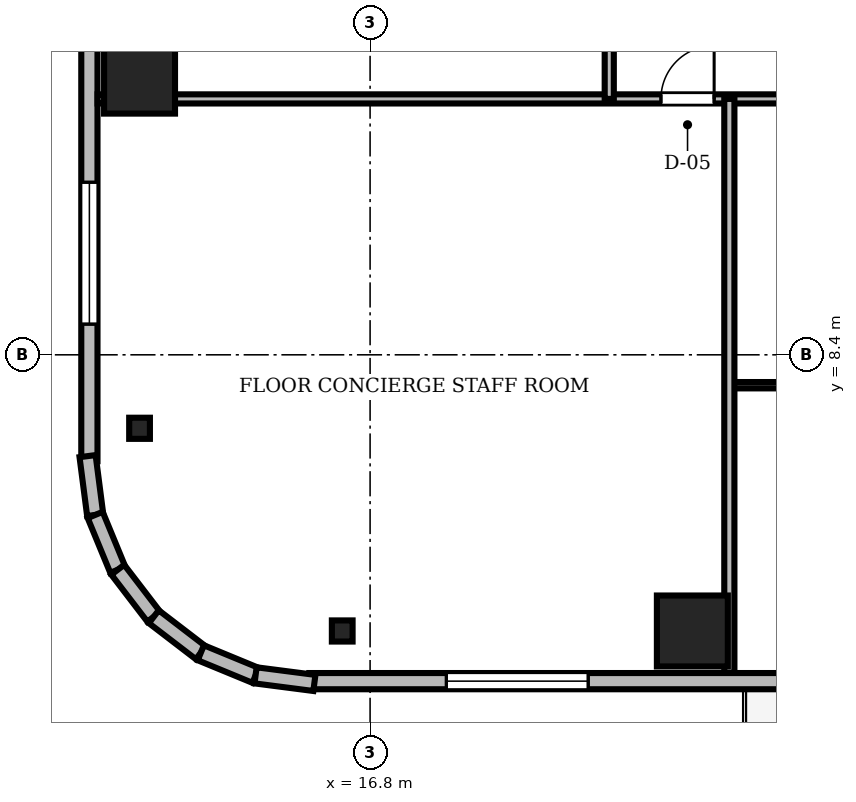
"""IFC4 building model, lengths in metres.
Left out: names, types, materials, properties, quantities, classifications, styles, units other than length and angle.
Written with IfcOpenShell. Run it as: python <this file> out.ifc"""

import sys

from ifc_helpers import new_model, si_unit, direction, frame, frame_2d, origin, origin_2d, place, context, subcontext, project, spatial, rectangle, i_section, extrude, source, transform, mapped, element, fill, save


model = new_model("IFC4")
c1 = context("Model", 3, precision=1e-05, world=origin(), true_north=direction((0.0, 1.0)))
c2 = subcontext(c1, "Body", "Model", "MODEL_VIEW")
j1 = project(units=[si_unit("LENGTHUNIT", "METRE"), si_unit("PLANEANGLEUNIT", "RADIAN")], contexts=[c1])
p1 = place(None, origin())
s1 = spatial("IfcSite", under=j1, at=p1, CompositionType="ELEMENT")
p2 = place(p1, origin())
s2 = spatial("IfcBuilding", under=s1, at=p2, CompositionType="ELEMENT")
p3 = place(p2, frame((0.0, 0.0, 203.55)))
s3 = spatial("IfcBuildingStorey", under=s2, at=p3, CompositionType="ELEMENT", Elevation=203.55)
m1 = source(origin(), c2, "Body", "SweptSolid", [
    extrude(rectangle(XDim=1.4, YDim=1.4, at=origin_2d()), origin(), (0.0, 0.0, 1.0), 3.53),
])
for number, where, z_axis, x_axis in (
    (1, (23.16, 2.95, 0.0), (0.0, 0.0, 1.0), (1.0, 0.0, 0.0)),
    (2, (12.25, 13.86, 0.0), (0.0, 0.0, 1.0), (1.0, 0.0, 0.0)),
):
    element("IfcColumn", number, at=place(p3, frame(where, z_axis=z_axis, x_axis=x_axis)), inside=s3, PredefinedType="COLUMN", context=c2, shape_type="MappedRepresentation", body=[
        mapped(m1, transform((0.0, 0.0, 0.0), scale=1.0)),
    ])
m2 = source(origin(), c2, "Body", "SweptSolid", [
    extrude(i_section(OverallWidth=0.409, OverallDepth=0.417, WebThickness=0.021, FlangeThickness=0.033, FilletRadius=0.015, at=origin_2d()), origin(), (0.0, 0.0, 1.0), 3.53),
])
for number, where, z_axis, x_axis in (
    (3, (16.25, 2.95, 0.0), (0.0, 0.0, 1.0), (1.0, 0.0, 0.0)),
    (4, (12.25, 6.95, 0.0), (0.0, 0.0, 1.0), (1.0, 0.0, 0.0)),
):
    element("IfcColumn", number, at=place(p3, frame(where, z_axis=z_axis, x_axis=x_axis)), inside=s3, PredefinedType="COLUMN", context=c2, shape_type="MappedRepresentation", body=[
        mapped(m2, transform((0.0, 0.0, 0.0), scale=1.0)),
    ])
m3 = source(origin(), c2, "Body", "SweptSolid", [
    extrude(rectangle(XDim=15.6, YDim=0.32, at=frame_2d((7.8, 0.0))), origin(), (0.0, 0.0, 1.0), 3.53),
])
p4 = place(p3, frame((15.6, 1.96, 0.0), z_axis=(0.0, 0.0, 1.0), x_axis=(1.0, 0.0, 0.0)))
e5 = element("IfcWall", 5, at=p4, inside=s3, PredefinedType="SOLIDWALL", context=c2, shape_type="MappedRepresentation", body=[
    mapped(m3, transform((0.0, 0.0, 0.0), scale=1.0)),
])
m4 = source(origin(), c2, "Body", "SweptSolid", [
    extrude(rectangle(XDim=1.4, YDim=2.3, at=frame_2d((0.7, 1.15))), frame((0.0, 0.17, 0.0), z_axis=(0.0, -1.0, 0.0), x_axis=(1.0, 0.0, 0.0)), (0.0, 0.0, 1.0), 0.34),
])
p5 = place(p4, frame((9.61, 0.0, 0.0)))
e6 = element("IfcOpeningElement", 6, at=p5, cuts=e5, PredefinedType="OPENING", context=c2, shape_type="MappedRepresentation", body=[
    mapped(m4, transform((0.0, 0.0, 0.0), scale=1.0)),
])
m5 = source(origin(), c2, "Body", "SweptSolid", [
    extrude(rectangle(XDim=2.8, YDim=2.4, at=frame_2d((1.4, 1.2))), frame((0.0, 0.17, 0.0), z_axis=(0.0, -1.0, 0.0), x_axis=(1.0, 0.0, 0.0)), (0.0, 0.0, 1.0), 0.34),
])
p6 = place(p4, frame((2.705, 0.0, 0.72)))
e7 = element("IfcOpeningElement", 7, at=p6, cuts=e5, PredefinedType="OPENING", context=c2, shape_type="MappedRepresentation", body=[
    mapped(m5, transform((0.0, 0.0, 0.0), scale=1.0)),
])
p7 = place(p3, frame((11.26, 21.9, 0.0), z_axis=(0.0, 0.0, 1.0), x_axis=(0.0, -1.0, 0.0)))
e8 = element("IfcWall", 8, at=p7, inside=s3, PredefinedType="SOLIDWALL", context=c2, shape_type="MappedRepresentation", body=[
    mapped(m3, transform((0.0, 0.0, 0.0), scale=1.0)),
])
p8 = place(p7, frame((10.095, 0.0, 0.72)))
e9 = element("IfcOpeningElement", 9, at=p8, cuts=e8, PredefinedType="OPENING", context=c2, shape_type="MappedRepresentation", body=[
    mapped(m5, transform((0.0, 0.0, 0.0), scale=1.0)),
])
m6 = source(origin(), c2, "Body", "SweptSolid", [
    extrude(rectangle(XDim=1.171, YDim=0.32, at=frame_2d((0.585, 0.0))), origin(), (0.0, 0.0, 1.0), 3.53),
])
p9 = place(p3, frame((11.224, 6.401, 0.0), z_axis=(0.0, 0.0, 1.0), x_axis=(0.128269133229, -0.991739395941, 0.0)))
e10 = element("IfcWall", 10, at=p9, inside=s3, PredefinedType="SOLIDWALL", context=c2, shape_type="MappedRepresentation", body=[
    mapped(m6, transform((0.0, 0.0, 0.0), scale=1.0)),
])
m7 = source(origin(), c2, "Body", "SweptSolid", [
    extrude(rectangle(XDim=1.169, YDim=0.32, at=frame_2d((0.584, 0.0))), origin(), (0.0, 0.0, 1.0), 3.53),
])
for number, where, z_axis, x_axis in (
    (11, (11.375, 5.24, 0.0), (0.0, 0.0, 1.0), (0.381, -0.925, 0.0)),
    (12, (11.82, 4.159, 0.0), (0.0, 0.0, 1.0), (0.608, -0.794, 0.0)),
):
    element("IfcWall", number, at=place(p3, frame(where, z_axis=z_axis, x_axis=x_axis)), inside=s3, PredefinedType="SOLIDWALL", context=c2, shape_type="MappedRepresentation", body=[
        mapped(m7, transform((0.0, 0.0, 0.0), scale=1.0)),
    ])
m8 = source(origin(), c2, "Body", "SweptSolid", [
    extrude(rectangle(XDim=1.169, YDim=0.32, at=frame_2d((0.584, 0.0))), origin(), (0.0, 0.0, 1.0), 3.53),
])
p10 = place(p3, frame((12.531, 3.231, 0.0), z_axis=(0.0, 0.0, 1.0), x_axis=(0.793663520347, -0.608356981114, 0.0)))
e13 = element("IfcWall", 13, at=p10, inside=s3, PredefinedType="SOLIDWALL", context=c2, shape_type="MappedRepresentation", body=[
    mapped(m8, transform((0.0, 0.0, 0.0), scale=1.0)),
])
m9 = source(origin(), c2, "Body", "SweptSolid", [
    extrude(rectangle(XDim=1.169, YDim=0.32, at=frame_2d((0.585, 0.0))), origin(), (0.0, 0.0, 1.0), 3.53),
])
p11 = place(p3, frame((13.459, 2.52, 0.0), z_axis=(0.0, 0.0, 1.0), x_axis=(0.924479075121, -0.381232789334, 0.0)))
e14 = element("IfcWall", 14, at=p11, inside=s3, PredefinedType="SOLIDWALL", context=c2, shape_type="MappedRepresentation", body=[
    mapped(m9, transform((0.0, 0.0, 0.0), scale=1.0)),
])
m10 = source(origin(), c2, "Body", "SweptSolid", [
    extrude(rectangle(XDim=1.17, YDim=0.32, at=frame_2d((0.585, 0.0))), origin(), (0.0, 0.0, 1.0), 3.53),
])
p12 = place(p3, frame((14.54, 2.074, 0.0), z_axis=(0.0, 0.0, 1.0), x_axis=(0.991762485493, -0.128090485085, 0.0)))
e15 = element("IfcWall", 15, at=p12, inside=s3, PredefinedType="SOLIDWALL", context=c2, shape_type="MappedRepresentation", body=[
    mapped(m10, transform((0.0, 0.0, 0.0), scale=1.0)),
])
m11 = source(origin(), c2, "Body", "SweptSolid", [
    extrude(rectangle(XDim=46.156, YDim=0.18, at=frame_2d((23.078, 0.0))), origin(), (0.0, 0.0, 1.0), 2.772),
])
p13 = place(p3, frame((11.422, 13.45, 0.0), z_axis=(0.0, 0.0, 1.0), x_axis=(1.0, 0.0, 0.0)))
e16 = element("IfcWall", 16, at=p13, inside=s3, PredefinedType="PARTITIONING", context=c2, shape_type="MappedRepresentation", body=[
    mapped(m11, transform((0.0, 0.0, 0.0), scale=1.0)),
])
m12 = source(origin(), c2, "Body", "SweptSolid", [
    extrude(rectangle(XDim=1.05, YDim=2.2, at=frame_2d((0.525, 1.1))), frame((0.0, 0.1, 0.0), z_axis=(0.0, -1.0, 0.0), x_axis=(1.0, 0.0, 0.0)), (0.0, 0.0, 1.0), 0.2),
])
p14 = place(p13, frame((11.118, 0.0, 0.0)))
e17 = element("IfcOpeningElement", 17, at=p14, cuts=e16, PredefinedType="OPENING", context=c2, shape_type="MappedRepresentation", body=[
    mapped(m12, transform((0.0, 0.0, 0.0), scale=1.0)),
])
p15 = place(p13, frame((14.939, 0.0, 0.0)))
e18 = element("IfcOpeningElement", 18, at=p15, cuts=e16, PredefinedType="OPENING", context=c2, shape_type="MappedRepresentation", body=[
    mapped(m12, transform((0.0, 0.0, 0.0), scale=1.0)),
])
p16 = place(p13, frame((20.922, 0.0, 0.0)))
e19 = element("IfcOpeningElement", 19, at=p16, cuts=e16, PredefinedType="OPENING", context=c2, shape_type="MappedRepresentation", body=[
    mapped(m12, transform((0.0, 0.0, 0.0), scale=1.0)),
])
p17 = place(p13, frame((26.904, 0.0, 0.0)))
e20 = element("IfcOpeningElement", 20, at=p17, cuts=e16, PredefinedType="OPENING", context=c2, shape_type="MappedRepresentation", body=[
    mapped(m12, transform((0.0, 0.0, 0.0), scale=1.0)),
])
p18 = place(p13, frame((32.887, 0.0, 0.0)))
e21 = element("IfcOpeningElement", 21, at=p18, cuts=e16, PredefinedType="OPENING", context=c2, shape_type="MappedRepresentation", body=[
    mapped(m12, transform((0.0, 0.0, 0.0), scale=1.0)),
])
p19 = place(p13, frame((37.498, 0.0, 0.0)))
e22 = element("IfcOpeningElement", 22, at=p19, cuts=e16, PredefinedType="OPENING", context=c2, shape_type="MappedRepresentation", body=[
    mapped(m12, transform((0.0, 0.0, 0.0), scale=1.0)),
])
m13 = source(origin(), c2, "Body", "SweptSolid", [
    extrude(rectangle(XDim=15.1, YDim=0.18, at=frame_2d((7.55, 0.0))), origin(), (0.0, 0.0, 1.0), 2.972),
])
p20 = place(p3, frame((21.52, 13.45, 0.0), z_axis=(0.0, 0.0, 1.0), x_axis=(0.0, 1.0, 0.0)))
e23 = element("IfcWall", 23, at=p20, inside=s3, PredefinedType="PARTITIONING", context=c2, shape_type="MappedRepresentation", body=[
    mapped(m13, transform((0.0, 0.0, 0.0), scale=1.0)),
])
p21 = place(p20, frame((1.972, 0.0, 0.0)))
e24 = element("IfcOpeningElement", 24, at=p21, cuts=e23, PredefinedType="OPENING", context=c2, shape_type="MappedRepresentation", body=[
    mapped(m12, transform((0.0, 0.0, 0.0), scale=1.0)),
])
m14 = source(origin(), c2, "Body", "SweptSolid", [
    extrude(rectangle(XDim=0.95, YDim=2.15, at=frame_2d((0.475, 1.075))), frame((0.0, 0.1, 0.0), z_axis=(0.0, -1.0, 0.0), x_axis=(1.0, 0.0, 0.0)), (0.0, 0.0, 1.0), 0.2),
])
p22 = place(p20, frame((8.18, 0.0, 0.0)))
e25 = element("IfcOpeningElement", 25, at=p22, cuts=e23, PredefinedType="OPENING", context=c2, shape_type="MappedRepresentation", body=[
    mapped(m14, transform((0.0, 0.0, 0.0), scale=1.0)),
])
p23 = place(p20, frame((13.163, 0.0, 0.0)))
e26 = element("IfcOpeningElement", 26, at=p23, cuts=e23, PredefinedType="OPENING", context=c2, shape_type="MappedRepresentation", body=[
    mapped(m14, transform((0.0, 0.0, 0.0), scale=1.0)),
])
m15 = source(origin(), c2, "Body", "SweptSolid", [
    extrude(rectangle(XDim=5.982, YDim=0.125, at=frame_2d((2.991, 0.0))), origin(), (0.0, 0.0, 1.0), 2.972),
])
p24 = place(p3, frame((23.89, 7.8, 0.0), z_axis=(0.0, 0.0, 1.0), x_axis=(1.0, 0.0, 0.0)))
e27 = element("IfcWall", 27, at=p24, inside=s3, PredefinedType="PARTITIONING", context=c2, shape_type="MappedRepresentation", body=[
    mapped(m15, transform((0.0, 0.0, 0.0), scale=1.0)),
])
m16 = source(origin(), c2, "Body", "SweptSolid", [
    extrude(rectangle(XDim=0.95, YDim=2.15, at=frame_2d((0.475, 1.075))), frame((0.0, 0.073, 0.0), z_axis=(0.0, -1.0, 0.0), x_axis=(1.0, 0.0, 0.0)), (0.0, 0.0, 1.0), 0.145),
])
p25 = place(p24, frame((2.511, 0.0, 0.0)))
e28 = element("IfcOpeningElement", 28, at=p25, cuts=e27, PredefinedType="OPENING", context=c2, shape_type="MappedRepresentation", body=[
    mapped(m16, transform((0.0, 0.0, 0.0), scale=1.0)),
])
m17 = source(origin(), c2, "Body", "SweptSolid", [
    extrude(rectangle(XDim=11.328, YDim=0.2, at=frame_2d((5.664, 0.0))), origin(), (0.0, 0.0, 1.0), 2.772),
])
p26 = place(p3, frame((23.89, 2.122, 0.0), z_axis=(0.0, 0.0, 1.0), x_axis=(0.0, 1.0, 0.0)))
e29 = element("IfcWall", 29, at=p26, inside=s3, PredefinedType="PARTITIONING", context=c2, shape_type="MappedRepresentation", body=[
    mapped(m17, transform((0.0, 0.0, 0.0), scale=1.0)),
])
m18 = source(origin(), c2, "Body", "SweptSolid", [
    extrude(rectangle(XDim=2.8, YDim=2.4, at=frame_2d((1.4, 1.2))), frame((0.0, 0.03, 0.0), z_axis=(0.0, -1.0, 0.0), x_axis=(1.0, 0.0, 0.0)), (0.0, 0.0, 1.0), 0.06),
])
p27 = place(p6, origin())
e30 = element("IfcWindow", 30, at=p27, inside=s3, PartitioningType="SINGLE_PANEL", PredefinedType="WINDOW", context=c2, shape_type="MappedRepresentation", body=[
    mapped(m18, transform((0.0, 0.0, 0.0), scale=1.0)),
])
fill(e7, e30)
p28 = place(p8, origin())
e31 = element("IfcWindow", 31, at=p28, inside=s3, PartitioningType="SINGLE_PANEL", PredefinedType="WINDOW", context=c2, shape_type="MappedRepresentation", body=[
    mapped(m18, transform((0.0, 0.0, 0.0), scale=1.0)),
])
fill(e9, e31)
m19 = source(origin(), c2, "Body", "SweptSolid", [
    extrude(rectangle(XDim=1.05, YDim=2.2, at=frame_2d((0.525, 1.1))), frame((0.0, 0.025, 0.0), z_axis=(0.0, -1.0, 0.0), x_axis=(1.0, 0.0, 0.0)), (0.0, 0.0, 1.0), 0.05),
])
p29 = place(p14, origin())
e32 = element("IfcDoor", 32, at=p29, inside=s3, OperationType="SINGLE_SWING_RIGHT", PredefinedType="DOOR", context=c2, shape_type="MappedRepresentation", body=[
    mapped(m19, transform((0.0, 0.0, 0.0), scale=1.0)),
])
fill(e17, e32)
save(model, sys.argv[1])
